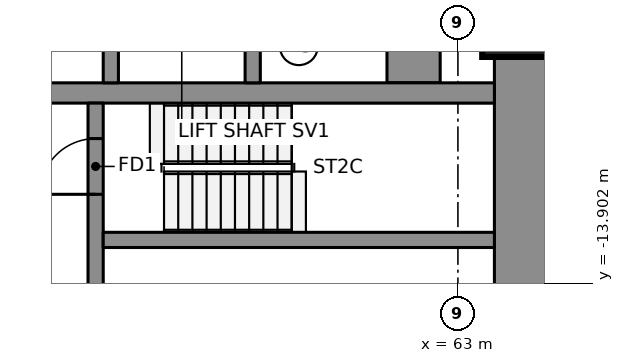
"""IFC4 building model, lengths in metres.
Left out: names, types, materials, properties, quantities, classifications, styles, units other than length and angle.
Written with IfcOpenShell. Run it as: python <this file> out.ifc"""

import sys

from ifc_helpers import new_model, si_unit, direction, frame, frame_2d, origin, origin_2d, place, context, subcontext, project, spatial, rectangle, extrude, element, fill, save


model = new_model("IFC4")
c1 = context("Model", 3, precision=1e-05, world=origin(), true_north=direction((0.0, 1.0)))
c2 = subcontext(c1, "Body", "Model", "MODEL_VIEW")
j1 = project(units=[si_unit("LENGTHUNIT", "METRE"), si_unit("PLANEANGLEUNIT", "RADIAN")], contexts=[c1])
p1 = place(None, origin())
s1 = spatial("IfcSite", under=j1, at=p1, CompositionType="ELEMENT")
p2 = place(p1, origin())
s2 = spatial("IfcBuilding", under=s1, at=p2, CompositionType="ELEMENT")
p3 = place(p2, frame((0.0, 0.0, 92.0)))
s3 = spatial("IfcBuildingStorey", under=s2, at=p3, CompositionType="ELEMENT", Elevation=92.0)
p4 = place(p3, frame((64.245, -15.75, 0.0), z_axis=(0.0, 0.0, 1.0), x_axis=(0.0, 1.0, 0.0)))
e1 = element("IfcWall", 1, at=p4, inside=s3, PredefinedType="SHEAR", context=c2, shape_type="SweptSolid", body=[
    extrude(rectangle(XDim=6.361, YDim=1.05, at=frame_2d((3.181, 0.0))), origin(), (0.0, 0.0, 1.0), 3.55),
])
p5 = place(p3, frame((62.125, -9.95, 0.0), z_axis=(0.0, 0.0, 1.0), x_axis=(0.0, 1.0, 0.0)))
e2 = element("IfcWall", 2, at=p5, inside=s3, PredefinedType="SHEAR", context=c2, shape_type="SweptSolid", body=[
    extrude(rectangle(XDim=19.9, YDim=1.05, at=frame_2d((9.95, 0.0))), origin(), (0.0, 0.0, 1.0), 3.55),
])
p6 = place(p3, frame((50.7, -10.15, 0.0), z_axis=(0.0, 0.0, 1.0), x_axis=(1.0, 0.0, 0.0)))
e3 = element("IfcWall", 3, at=p6, inside=s3, PredefinedType="SHEAR", context=c2, shape_type="SweptSolid", body=[
    extrude(rectangle(XDim=13.02, YDim=0.4, at=frame_2d((6.51, 0.0))), origin(), (0.0, 0.0, 1.0), 3.55),
])
for number, where, z_axis, x_axis in (
    (4, (56.15, -9.95, 0.0), (0.0, 0.0, 1.0), (0.0, 1.0, 0.0)),
    (5, (58.95, -9.95, 0.0), (0.0, 0.0, 1.0), (0.0, 1.0, 0.0)),
):
    element("IfcWall", number, at=place(p3, frame(where, z_axis=z_axis, x_axis=x_axis)), inside=s3, PredefinedType="SHEAR", context=c2, shape_type="SweptSolid", body=[
        extrude(rectangle(XDim=3.0, YDim=0.3, at=frame_2d((1.5, 0.0))), origin(), (0.0, 0.0, 1.0), 3.55),
    ])
p7 = place(p3, frame((55.85, -15.75, 0.0), z_axis=(0.0, 0.0, 1.0), x_axis=(0.0, 1.0, 0.0)))
e6 = element("IfcWall", 6, at=p7, inside=s3, PredefinedType="SHEAR", context=c2, shape_type="SweptSolid", body=[
    extrude(rectangle(XDim=5.4, YDim=0.3, at=frame_2d((2.7, 0.0))), origin(), (0.0, 0.0, 1.0), 3.55),
])
p8 = place(p7, frame((3.6, 0.0, 0.0)))
e7 = element("IfcOpeningElement", 7, at=p8, cuts=e6, PredefinedType="OPENING", context=c2, shape_type="SweptSolid", body=[
    extrude(rectangle(XDim=1.1, YDim=2.1, at=frame_2d((0.55, 1.05))), frame((0.0, 0.16, 0.0), z_axis=(0.0, -1.0, 0.0), x_axis=(1.0, 0.0, 0.0)), (0.0, 0.0, 1.0), 0.32),
])
p9 = place(p7, frame((0.8, 0.0, 0.0)))
e8 = element("IfcOpeningElement", 8, at=p9, cuts=e6, PredefinedType="OPENING", context=c2, shape_type="SweptSolid", body=[
    extrude(rectangle(XDim=0.9, YDim=2.1, at=frame_2d((0.45, 1.05))), frame((0.0, 0.16, 0.0), z_axis=(0.0, -1.0, 0.0), x_axis=(1.0, 0.0, 0.0)), (0.0, 0.0, 1.0), 0.32),
])
p10 = place(p3, frame((56.0, -13.05, 0.0), z_axis=(0.0, 0.0, 1.0), x_axis=(1.0, 0.0, 0.0)))
e9 = element("IfcWall", 9, at=p10, inside=s3, PredefinedType="SHEAR", context=c2, shape_type="SweptSolid", body=[
    extrude(rectangle(XDim=7.72, YDim=0.3, at=frame_2d((3.86, 0.0))), origin(), (0.0, 0.0, 1.0), 3.55),
])
p11 = place(p3, frame((64.329, -8.589, 0.0), z_axis=(0.0, 0.0, 1.0), x_axis=(1.0, 0.0, 0.0)))
e10 = element("IfcColumn", 10, at=p11, inside=s3, PredefinedType="COLUMN", context=c2, shape_type="SweptSolid", body=[
    extrude(rectangle(XDim=1.7, YDim=1.7, at=origin_2d()), origin(), (0.0, 0.0, 1.0), 3.55),
])
p12 = place(p8, origin())
e11 = element("IfcDoor", 11, at=p12, inside=s3, OperationType="SINGLE_SWING_RIGHT", PredefinedType="DOOR", context=c2, shape_type="SweptSolid", body=[
    extrude(rectangle(XDim=1.1, YDim=2.1, at=frame_2d((0.55, 1.05))), frame((0.0, 0.025, 0.0), z_axis=(0.0, -1.0, 0.0), x_axis=(1.0, 0.0, 0.0)), (0.0, 0.0, 1.0), 0.05),
])
fill(e7, e11)
save(model, sys.argv[1])
